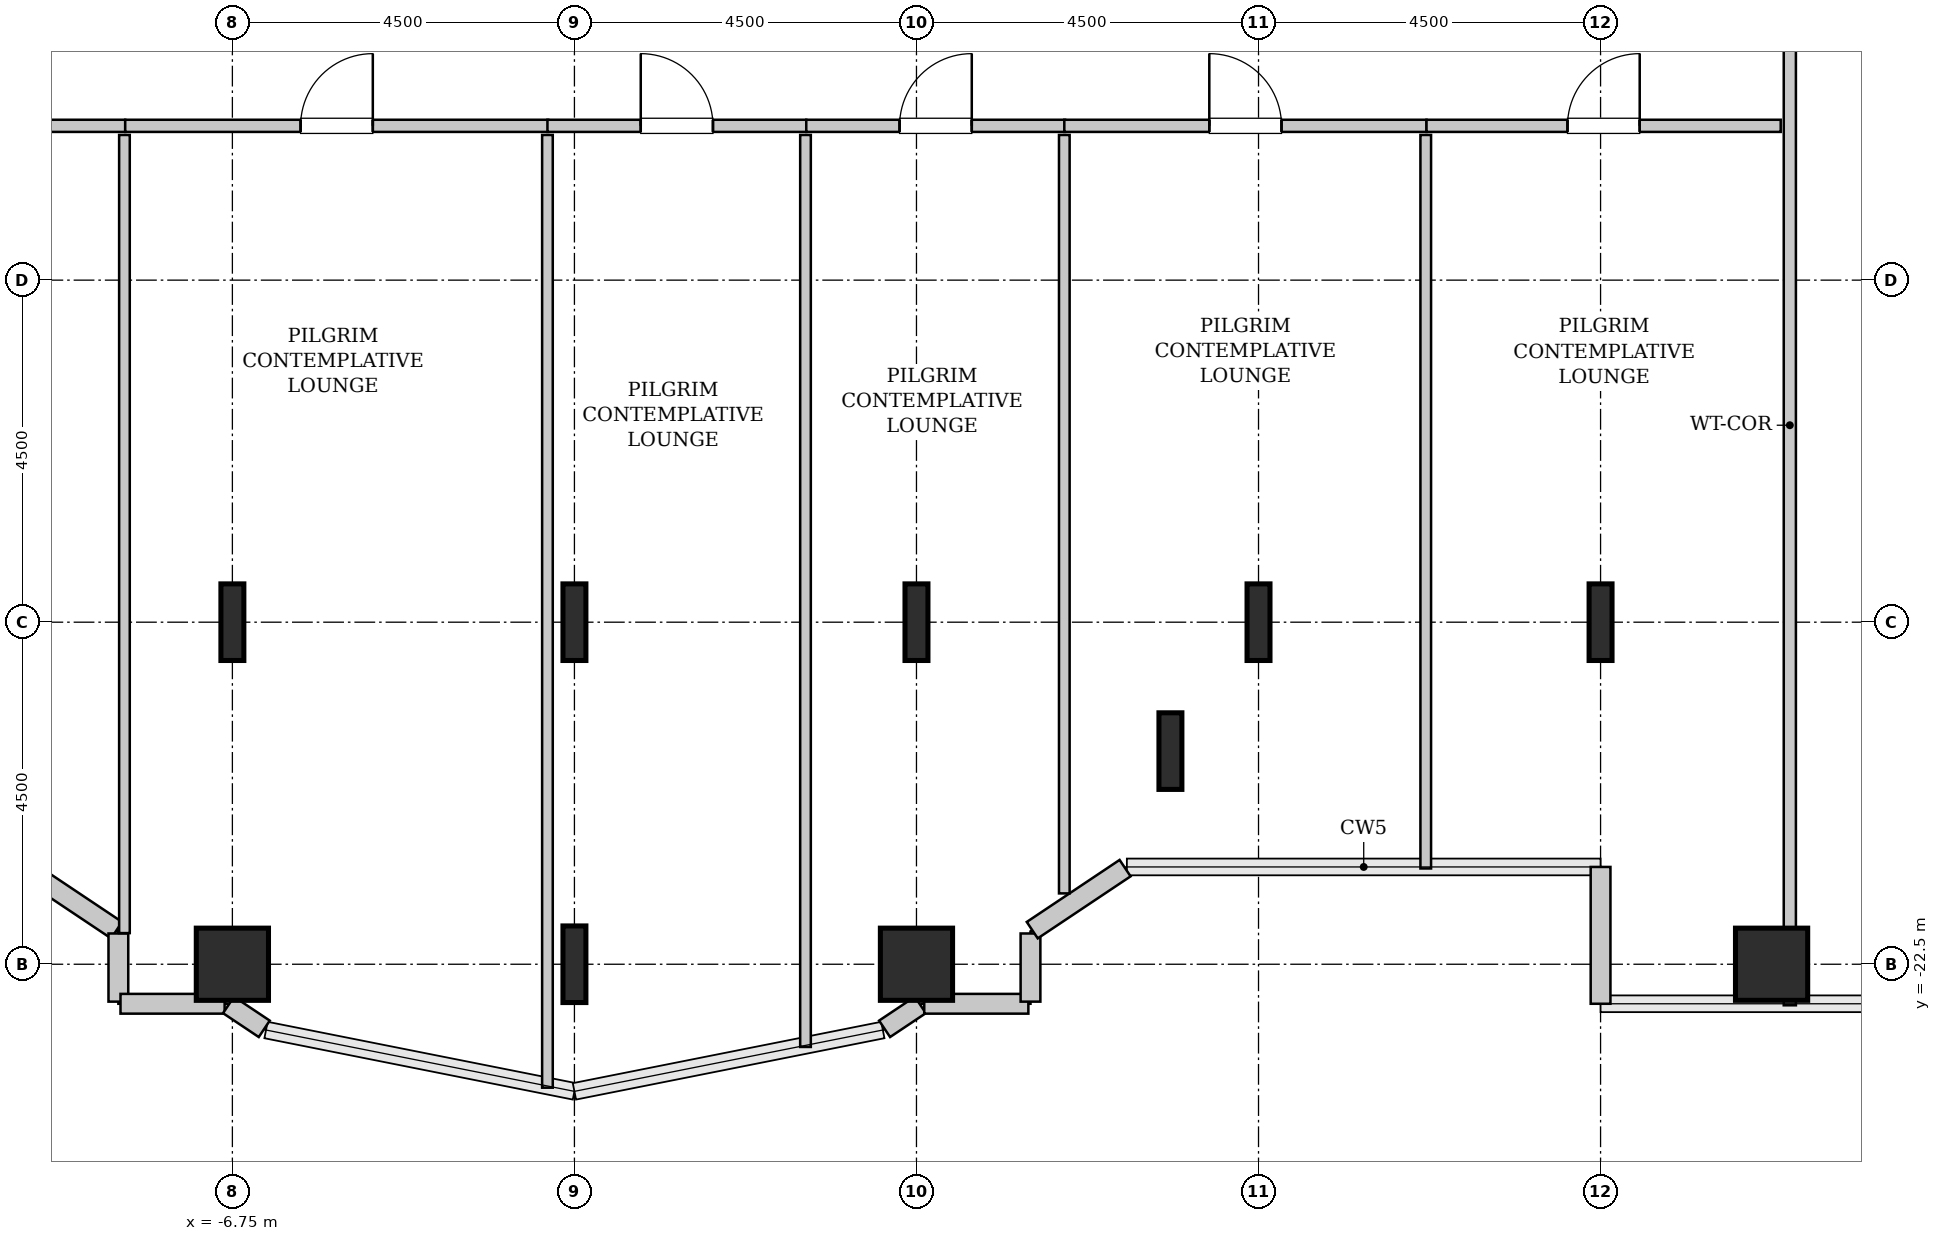
"""IFC4 building model, lengths in metres.
Left out: names, types, materials, properties, quantities, classifications, styles, units other than length and angle.
Written with IfcOpenShell. Run it as: python <this file> out.ifc"""

import sys

from ifc_helpers import new_model, si_unit, direction, frame, frame_2d, origin, origin_2d, place, context, subcontext, project, spatial, rectangle, hollow_rectangle, i_section, extrude, source, transform, mapped, element, fill, save


model = new_model("IFC4")
c1 = context("Model", 3, precision=1e-05, world=origin(), true_north=direction((0.0, 1.0)))
c2 = subcontext(c1, "Body", "Model", "MODEL_VIEW")
j1 = project(units=[si_unit("LENGTHUNIT", "METRE"), si_unit("PLANEANGLEUNIT", "RADIAN")], contexts=[c1])
p1 = place(None, origin())
s1 = spatial("IfcSite", under=j1, at=p1, CompositionType="ELEMENT")
p2 = place(p1, origin())
s2 = spatial("IfcBuilding", under=s1, at=p2, CompositionType="ELEMENT")
p3 = place(p2, frame((0.0, 0.0, 106.0)))
s3 = spatial("IfcBuildingStorey", under=s2, at=p3, CompositionType="ELEMENT", Elevation=106.0)
m1 = source(origin(), c2, "Body", "SweptSolid", [
    extrude(hollow_rectangle(XDim=0.95, YDim=0.95, WallThickness=0.045, InnerFilletRadius=0.045, OuterFilletRadius=0.09, at=origin_2d()), origin(), (0.0, 0.0, 1.0), 3.8),
])
p4 = place(p3, frame((-6.75, -22.5, 0.0), z_axis=(0.0, 0.0, 1.0), x_axis=(1.0, 0.0, 0.0)))
e1 = element("IfcColumn", 1, at=p4, inside=s3, PredefinedType="COLUMN", context=c2, shape_type="MappedRepresentation", body=[
    mapped(m1, transform((0.0, 0.0, 0.0), x_axis=(1.0, 0.0, 0.0), y_axis=(0.0, 1.0, 0.0), z_axis=(0.0, 0.0, 1.0), scale=1.0)),
])
m2 = source(origin(), c2, "Body", "SweptSolid", [
    extrude(i_section(OverallWidth=0.302, OverallDepth=1.008, WebThickness=0.021, FlangeThickness=0.04, FilletRadius=0.03, at=origin_2d()), origin(), (0.0, 0.0, 1.0), 3.8),
])
for number, where, z_axis, x_axis in (
    (2, (-6.75, -18.0, 0.0), (0.0, 0.0, 1.0), (1.0, 0.0, 0.0)),
    (3, (-2.25, -22.5, 0.0), (0.0, 0.0, 1.0), (1.0, 0.0, 0.0)),
    (4, (-2.25, -18.0, 0.0), (0.0, 0.0, 1.0), (1.0, 0.0, 0.0)),
):
    element("IfcColumn", number, at=place(p3, frame(where, z_axis=z_axis, x_axis=x_axis)), inside=s3, PredefinedType="COLUMN", context=c2, shape_type="MappedRepresentation", body=[
        mapped(m2, transform((0.0, 0.0, 0.0), x_axis=(1.0, 0.0, 0.0), y_axis=(0.0, 1.0, 0.0), z_axis=(0.0, 0.0, 1.0), scale=1.0)),
    ])
p5 = place(p3, frame((2.25, -22.5, 0.0), z_axis=(0.0, 0.0, 1.0), x_axis=(1.0, 0.0, 0.0)))
e5 = element("IfcColumn", 5, at=p5, inside=s3, PredefinedType="COLUMN", context=c2, shape_type="MappedRepresentation", body=[
    mapped(m1, transform((0.0, 0.0, 0.0), x_axis=(1.0, 0.0, 0.0), y_axis=(0.0, 1.0, 0.0), z_axis=(0.0, 0.0, 1.0), scale=1.0)),
])
for number, where, z_axis, x_axis in (
    (6, (2.25, -18.0, 0.0), (0.0, 0.0, 1.0), (1.0, 0.0, 0.0)),
    (7, (5.591, -19.696, 0.0), (0.0, 0.0, 1.0), (1.0, 0.0, 0.0)),
    (8, (6.75, -18.0, 0.0), (0.0, 0.0, 1.0), (1.0, 0.0, 0.0)),
    (9, (11.25, -18.0, 0.0), (0.0, 0.0, 1.0), (1.0, 0.0, 0.0)),
):
    element("IfcColumn", number, at=place(p3, frame(where, z_axis=z_axis, x_axis=x_axis)), inside=s3, PredefinedType="COLUMN", context=c2, shape_type="MappedRepresentation", body=[
        mapped(m2, transform((0.0, 0.0, 0.0), x_axis=(1.0, 0.0, 0.0), y_axis=(0.0, 1.0, 0.0), z_axis=(0.0, 0.0, 1.0), scale=1.0)),
    ])
p6 = place(p3, frame((13.5, -22.5, 0.0), z_axis=(0.0, 0.0, 1.0), x_axis=(1.0, 0.0, 0.0)))
e10 = element("IfcColumn", 10, at=p6, inside=s3, PredefinedType="COLUMN", context=c2, shape_type="MappedRepresentation", body=[
    mapped(m1, transform((0.0, 0.0, 0.0), x_axis=(1.0, 0.0, 0.0), y_axis=(0.0, 1.0, 0.0), z_axis=(0.0, 0.0, 1.0), scale=1.0)),
])
m3 = source(origin(), c2, "Body", "SweptSolid", [
    extrude(rectangle(XDim=1.8, YDim=0.26, at=frame_2d((0.9, 0.0))), origin(), (0.0, 0.0, 1.0), 3.55),
])
p7 = place(p3, frame((11.25, -21.22, 0.0), z_axis=(0.0, 0.0, 1.0), x_axis=(0.0, -1.0, 0.0)))
e11 = element("IfcWall", 11, at=p7, inside=s3, PredefinedType="SOLIDWALL", context=c2, shape_type="MappedRepresentation", body=[
    mapped(m3, transform((0.0, 0.0, 0.0), x_axis=(1.0, 0.0, 0.0), y_axis=(0.0, 1.0, 0.0), z_axis=(0.0, 0.0, 1.0), scale=1.0)),
])
m4 = source(origin(), c2, "Body", "SweptSolid", [
    extrude(rectangle(XDim=1.469, YDim=0.26, at=frame_2d((0.734, 0.0))), origin(), (0.0, 0.0, 1.0), 3.55),
])
p8 = place(p3, frame((-9.495, -21.236, 0.0), z_axis=(0.0, 0.0, 1.0), x_axis=(0.831461760506, -0.555581983884, 0.0)))
e12 = element("IfcWall", 12, at=p8, inside=s3, PredefinedType="SOLIDWALL", context=c2, shape_type="MappedRepresentation", body=[
    mapped(m4, transform((0.0, 0.0, 0.0), x_axis=(1.0, 0.0, 0.0), y_axis=(0.0, 1.0, 0.0), z_axis=(0.0, 0.0, 1.0), scale=1.0)),
])
m5 = source(origin(), c2, "Body", "SweptSolid", [
    extrude(rectangle(XDim=0.897, YDim=0.26, at=frame_2d((0.448, 0.0))), origin(), (0.0, 0.0, 1.0), 3.55),
])
p9 = place(p3, frame((-8.25, -22.095, 0.0), z_axis=(0.0, 0.0, 1.0), x_axis=(0.0, -1.0, 0.0)))
e13 = element("IfcWall", 13, at=p9, inside=s3, PredefinedType="SOLIDWALL", context=c2, shape_type="MappedRepresentation", body=[
    mapped(m5, transform((0.0, 0.0, 0.0), x_axis=(1.0, 0.0, 0.0), y_axis=(0.0, 1.0, 0.0), z_axis=(0.0, 0.0, 1.0), scale=1.0)),
])
m6 = source(origin(), c2, "Body", "SweptSolid", [
    extrude(rectangle(XDim=1.37, YDim=0.26, at=frame_2d((0.685, 0.0))), origin(), (0.0, 0.0, 1.0), 3.55),
])
p10 = place(p3, frame((-8.222, -23.02, 0.0), z_axis=(0.0, 0.0, 1.0), x_axis=(1.0, 0.0, 0.0)))
e14 = element("IfcWall", 14, at=p10, inside=s3, PredefinedType="SOLIDWALL", context=c2, shape_type="MappedRepresentation", body=[
    mapped(m6, transform((0.0, 0.0, 0.0), x_axis=(1.0, 0.0, 0.0), y_axis=(0.0, 1.0, 0.0), z_axis=(0.0, 0.0, 1.0), scale=1.0)),
])
m7 = source(origin(), c2, "Body", "SweptSolid", [
    extrude(rectangle(XDim=0.565, YDim=0.26, at=frame_2d((0.283, 0.0))), origin(), (0.0, 0.0, 1.0), 3.55),
])
for number, where, z_axis, x_axis in (
    (15, (-6.801, -23.036, 0.0), (0.0, 0.0, 1.0), (0.832, -0.555, 0.0)),
    (16, (1.831, -23.35, 0.0), (0.0, 0.0, 1.0), (0.832, 0.555, 0.0)),
):
    element("IfcWall", number, at=place(p3, frame(where, z_axis=z_axis, x_axis=x_axis)), inside=s3, PredefinedType="SOLIDWALL", context=c2, shape_type="MappedRepresentation", body=[
        mapped(m7, transform((0.0, 0.0, 0.0), x_axis=(1.0, 0.0, 0.0), y_axis=(0.0, 1.0, 0.0), z_axis=(0.0, 0.0, 1.0), scale=1.0)),
    ])
p11 = place(p3, frame((2.352, -23.02, 0.0), z_axis=(0.0, 0.0, 1.0), x_axis=(1.0, 0.0, 0.0)))
e17 = element("IfcWall", 17, at=p11, inside=s3, PredefinedType="SOLIDWALL", context=c2, shape_type="MappedRepresentation", body=[
    mapped(m6, transform((0.0, 0.0, 0.0), x_axis=(1.0, 0.0, 0.0), y_axis=(0.0, 1.0, 0.0), z_axis=(0.0, 0.0, 1.0), scale=1.0)),
])
p12 = place(p3, frame((3.75, -22.992, 0.0), z_axis=(0.0, 0.0, 1.0), x_axis=(0.0, 1.0, 0.0)))
e18 = element("IfcWall", 18, at=p12, inside=s3, PredefinedType="SOLIDWALL", context=c2, shape_type="MappedRepresentation", body=[
    mapped(m5, transform((0.0, 0.0, 0.0), x_axis=(1.0, 0.0, 0.0), y_axis=(0.0, 1.0, 0.0), z_axis=(0.0, 0.0, 1.0), scale=1.0)),
])
p13 = place(p3, frame((3.773, -22.052, 0.0), z_axis=(0.0, 0.0, 1.0), x_axis=(0.831461760506, 0.555581983884, 0.0)))
e19 = element("IfcWall", 19, at=p13, inside=s3, PredefinedType="SOLIDWALL", context=c2, shape_type="MappedRepresentation", body=[
    mapped(m4, transform((0.0, 0.0, 0.0), x_axis=(1.0, 0.0, 0.0), y_axis=(0.0, 1.0, 0.0), z_axis=(0.0, 0.0, 1.0), scale=1.0)),
])
m8 = source(origin(), c2, "Body", "SweptSolid", [
    extrude(rectangle(XDim=19.845, YDim=0.16, at=frame_2d((9.922, 0.0))), origin(), (0.0, 0.0, 1.0), 3.535),
])
p14 = place(p3, frame((13.74, -23.04, 0.0), z_axis=(0.0, 0.0, 1.0), x_axis=(0.0, 1.0, 0.0)))
e20 = element("IfcWall", 20, at=p14, inside=s3, PredefinedType="PARTITIONING", context=c2, shape_type="MappedRepresentation", body=[
    mapped(m8, transform((0.0, 0.0, 0.0), x_axis=(1.0, 0.0, 0.0), y_axis=(0.0, 1.0, 0.0), z_axis=(0.0, 0.0, 1.0), scale=1.0)),
])
p15 = place(p14, frame((15.212, 0.0, 0.0)))
e21 = element("IfcOpeningElement", 21, at=p15, cuts=e20, PredefinedType="OPENING", context=c2, shape_type="SweptSolid", body=[
    extrude(rectangle(XDim=0.95, YDim=2.1, at=frame_2d((0.475, 1.05))), frame((0.0, 0.09, 0.0), z_axis=(0.0, -1.0, 0.0), x_axis=(1.0, 0.0, 0.0)), (0.0, 0.0, 1.0), 0.18),
])
m9 = source(origin(), c2, "Body", "SweptSolid", [
    extrude(rectangle(XDim=5.46, YDim=0.16, at=frame_2d((2.73, 0.0))), origin(), (0.0, 0.0, 1.0), 3.535),
])
p16 = place(p3, frame((-13.62, -11.47, 0.0), z_axis=(0.0, 0.0, 1.0), x_axis=(1.0, 0.0, 0.0)))
e22 = element("IfcWall", 22, at=p16, inside=s3, PredefinedType="PARTITIONING", context=c2, shape_type="MappedRepresentation", body=[
    mapped(m9, transform((0.0, 0.0, 0.0), x_axis=(1.0, 0.0, 0.0), y_axis=(0.0, 1.0, 0.0), z_axis=(0.0, 0.0, 1.0), scale=1.0)),
])
p17 = place(p16, frame((2.255, 0.0, 0.0)))
e23 = element("IfcOpeningElement", 23, at=p17, cuts=e22, PredefinedType="OPENING", context=c2, shape_type="SweptSolid", body=[
    extrude(rectangle(XDim=0.95, YDim=2.1, at=frame_2d((0.475, 1.05))), frame((0.0, 0.09, 0.0), z_axis=(0.0, -1.0, 0.0), x_axis=(1.0, 0.0, 0.0)), (0.0, 0.0, 1.0), 0.18),
])
m10 = source(origin(), c2, "Body", "SweptSolid", [
    extrude(rectangle(XDim=10.5, YDim=0.14, at=frame_2d((5.25, 0.0))), origin(), (0.0, 0.0, 1.0), 3.535),
])
p18 = place(p3, frame((-8.17, -22.09, 0.0), z_axis=(0.0, 0.0, 1.0), x_axis=(0.0, 1.0, 0.0)))
e24 = element("IfcWall", 24, at=p18, inside=s3, PredefinedType="PARTITIONING", context=c2, shape_type="MappedRepresentation", body=[
    mapped(m10, transform((0.0, 0.0, 0.0), x_axis=(1.0, 0.0, 0.0), y_axis=(0.0, 1.0, 0.0), z_axis=(0.0, 0.0, 1.0), scale=1.0)),
])
m11 = source(origin(), c2, "Body", "SweptSolid", [
    extrude(rectangle(XDim=5.565, YDim=0.16, at=frame_2d((2.782, 0.0))), origin(), (0.0, 0.0, 1.0), 3.535),
])
p19 = place(p3, frame((-8.16, -11.47, 0.0), z_axis=(0.0, 0.0, 1.0), x_axis=(1.0, 0.0, 0.0)))
e25 = element("IfcWall", 25, at=p19, inside=s3, PredefinedType="PARTITIONING", context=c2, shape_type="MappedRepresentation", body=[
    mapped(m11, transform((0.0, 0.0, 0.0), x_axis=(1.0, 0.0, 0.0), y_axis=(0.0, 1.0, 0.0), z_axis=(0.0, 0.0, 1.0), scale=1.0)),
])
p20 = place(p19, frame((2.308, 0.0, 0.0)))
e26 = element("IfcOpeningElement", 26, at=p20, cuts=e25, PredefinedType="OPENING", context=c2, shape_type="SweptSolid", body=[
    extrude(rectangle(XDim=0.95, YDim=2.1, at=frame_2d((0.475, 1.05))), frame((0.0, 0.09, 0.0), z_axis=(0.0, -1.0, 0.0), x_axis=(1.0, 0.0, 0.0)), (0.0, 0.0, 1.0), 0.18),
])
m12 = source(origin(), c2, "Body", "SweptSolid", [
    extrude(rectangle(XDim=12.534, YDim=0.14, at=frame_2d((6.267, 0.0))), origin(), (0.0, 0.0, 1.0), 2.825),
])
p21 = place(p3, frame((-2.605, -24.124, 0.0), z_axis=(0.0, 0.0, 1.0), x_axis=(0.0, 1.0, 0.0)))
e27 = element("IfcWall", 27, at=p21, inside=s3, PredefinedType="PARTITIONING", context=c2, shape_type="MappedRepresentation", body=[
    mapped(m12, transform((0.0, 0.0, 0.0), x_axis=(1.0, 0.0, 0.0), y_axis=(0.0, 1.0, 0.0), z_axis=(0.0, 0.0, 1.0), scale=1.0)),
])
m13 = source(origin(), c2, "Body", "SweptSolid", [
    extrude(rectangle(XDim=3.405, YDim=0.16, at=frame_2d((1.703, 0.0))), origin(), (0.0, 0.0, 1.0), 3.535),
])
p22 = place(p3, frame((-2.605, -11.47, 0.0), z_axis=(0.0, 0.0, 1.0), x_axis=(1.0, 0.0, 0.0)))
e28 = element("IfcWall", 28, at=p22, inside=s3, PredefinedType="PARTITIONING", context=c2, shape_type="MappedRepresentation", body=[
    mapped(m13, transform((0.0, 0.0, 0.0), x_axis=(1.0, 0.0, 0.0), y_axis=(0.0, 1.0, 0.0), z_axis=(0.0, 0.0, 1.0), scale=1.0)),
])
p23 = place(p22, frame((1.228, 0.0, 0.0)))
e29 = element("IfcOpeningElement", 29, at=p23, cuts=e28, PredefinedType="OPENING", context=c2, shape_type="SweptSolid", body=[
    extrude(rectangle(XDim=0.95, YDim=2.1, at=frame_2d((0.475, 1.05))), frame((0.0, 0.09, 0.0), z_axis=(0.0, -1.0, 0.0), x_axis=(1.0, 0.0, 0.0)), (0.0, 0.0, 1.0), 0.18),
])
m14 = source(origin(), c2, "Body", "SweptSolid", [
    extrude(rectangle(XDim=11.998, YDim=0.14, at=frame_2d((5.999, 0.0))), origin(), (0.0, 0.0, 1.0), 3.535),
])
p24 = place(p3, frame((0.79, -23.588, 0.0), z_axis=(0.0, 0.0, 1.0), x_axis=(0.0, 1.0, 0.0)))
e30 = element("IfcWall", 30, at=p24, inside=s3, PredefinedType="PARTITIONING", context=c2, shape_type="MappedRepresentation", body=[
    mapped(m14, transform((0.0, 0.0, 0.0), x_axis=(1.0, 0.0, 0.0), y_axis=(0.0, 1.0, 0.0), z_axis=(0.0, 0.0, 1.0), scale=1.0)),
])
p25 = place(p3, frame((0.8, -11.47, 0.0), z_axis=(0.0, 0.0, 1.0), x_axis=(1.0, 0.0, 0.0)))
e31 = element("IfcWall", 31, at=p25, inside=s3, PredefinedType="PARTITIONING", context=c2, shape_type="MappedRepresentation", body=[
    mapped(m13, transform((0.0, 0.0, 0.0), x_axis=(1.0, 0.0, 0.0), y_axis=(0.0, 1.0, 0.0), z_axis=(0.0, 0.0, 1.0), scale=1.0)),
])
p26 = place(p25, frame((1.228, 0.0, 0.0)))
e32 = element("IfcOpeningElement", 32, at=p26, cuts=e31, PredefinedType="OPENING", context=c2, shape_type="SweptSolid", body=[
    extrude(rectangle(XDim=0.95, YDim=2.1, at=frame_2d((0.475, 1.05))), frame((0.0, 0.09, 0.0), z_axis=(0.0, -1.0, 0.0), x_axis=(1.0, 0.0, 0.0)), (0.0, 0.0, 1.0), 0.18),
])
m15 = source(origin(), c2, "Body", "SweptSolid", [
    extrude(rectangle(XDim=9.978, YDim=0.14, at=frame_2d((4.989, 0.0))), origin(), (0.0, 0.0, 1.0), 3.535),
])
p27 = place(p3, frame((4.195, -21.568, 0.0), z_axis=(0.0, 0.0, 1.0), x_axis=(0.0, 1.0, 0.0)))
e33 = element("IfcWall", 33, at=p27, inside=s3, PredefinedType="PARTITIONING", context=c2, shape_type="MappedRepresentation", body=[
    mapped(m15, transform((0.0, 0.0, 0.0), x_axis=(1.0, 0.0, 0.0), y_axis=(0.0, 1.0, 0.0), z_axis=(0.0, 0.0, 1.0), scale=1.0)),
])
m16 = source(origin(), c2, "Body", "SweptSolid", [
    extrude(rectangle(XDim=4.765, YDim=0.16, at=frame_2d((2.382, 0.0))), origin(), (0.0, 0.0, 1.0), 3.535),
])
p28 = place(p3, frame((4.195, -11.47, 0.0), z_axis=(0.0, 0.0, 1.0), x_axis=(1.0, 0.0, 0.0)))
e34 = element("IfcWall", 34, at=p28, inside=s3, PredefinedType="PARTITIONING", context=c2, shape_type="MappedRepresentation", body=[
    mapped(m16, transform((0.0, 0.0, 0.0), x_axis=(1.0, 0.0, 0.0), y_axis=(0.0, 1.0, 0.0), z_axis=(0.0, 0.0, 1.0), scale=1.0)),
])
p29 = place(p28, frame((1.907, 0.0, 0.0)))
e35 = element("IfcOpeningElement", 35, at=p29, cuts=e34, PredefinedType="OPENING", context=c2, shape_type="SweptSolid", body=[
    extrude(rectangle(XDim=0.95, YDim=2.1, at=frame_2d((0.475, 1.05))), frame((0.0, 0.09, 0.0), z_axis=(0.0, -1.0, 0.0), x_axis=(1.0, 0.0, 0.0)), (0.0, 0.0, 1.0), 0.18),
])
m17 = source(origin(), c2, "Body", "SweptSolid", [
    extrude(rectangle(XDim=9.65, YDim=0.14, at=frame_2d((4.825, 0.0))), origin(), (0.0, 0.0, 1.0), 3.535),
])
p30 = place(p3, frame((8.95, -21.24, 0.0), z_axis=(0.0, 0.0, 1.0), x_axis=(0.0, 1.0, 0.0)))
e36 = element("IfcWall", 36, at=p30, inside=s3, PredefinedType="PARTITIONING", context=c2, shape_type="MappedRepresentation", body=[
    mapped(m17, transform((0.0, 0.0, 0.0), x_axis=(1.0, 0.0, 0.0), y_axis=(0.0, 1.0, 0.0), z_axis=(0.0, 0.0, 1.0), scale=1.0)),
])
m18 = source(origin(), c2, "Body", "SweptSolid", [
    extrude(rectangle(XDim=4.66, YDim=0.16, at=frame_2d((2.33, 0.0))), origin(), (0.0, 0.0, 1.0), 3.535),
])
p31 = place(p3, frame((8.96, -11.47, 0.0), z_axis=(0.0, 0.0, 1.0), x_axis=(1.0, 0.0, 0.0)))
e37 = element("IfcWall", 37, at=p31, inside=s3, PredefinedType="PARTITIONING", context=c2, shape_type="MappedRepresentation", body=[
    mapped(m18, transform((0.0, 0.0, 0.0), x_axis=(1.0, 0.0, 0.0), y_axis=(0.0, 1.0, 0.0), z_axis=(0.0, 0.0, 1.0), scale=1.0)),
])
p32 = place(p31, frame((1.855, 0.0, 0.0)))
e38 = element("IfcOpeningElement", 38, at=p32, cuts=e37, PredefinedType="OPENING", context=c2, shape_type="SweptSolid", body=[
    extrude(rectangle(XDim=0.95, YDim=2.1, at=frame_2d((0.475, 1.05))), frame((0.0, 0.09, 0.0), z_axis=(0.0, -1.0, 0.0), x_axis=(1.0, 0.0, 0.0)), (0.0, 0.0, 1.0), 0.18),
])
m19 = source(origin(), c2, "Body", "SweptSolid", [
    extrude(rectangle(XDim=0.95, YDim=2.1, at=frame_2d((0.475, 1.05))), frame((0.0, 0.025, 0.0), z_axis=(0.0, -1.0, 0.0), x_axis=(1.0, 0.0, 0.0)), (0.0, 0.0, 1.0), 0.05),
])
p33 = place(p20, origin())
e39 = element("IfcDoor", 39, at=p33, inside=s3, OperationType="SINGLE_SWING_RIGHT", PredefinedType="DOOR", context=c2, shape_type="MappedRepresentation", body=[
    mapped(m19, transform((0.0, 0.0, 0.0), x_axis=(1.0, 0.0, 0.0), y_axis=(0.0, 1.0, 0.0), z_axis=(0.0, 0.0, 1.0), scale=1.0)),
])
fill(e26, e39)
p34 = place(p23, origin())
e40 = element("IfcDoor", 40, at=p34, inside=s3, OperationType="SINGLE_SWING_LEFT", PredefinedType="DOOR", context=c2, shape_type="MappedRepresentation", body=[
    mapped(m19, transform((0.0, 0.0, 0.0), x_axis=(1.0, 0.0, 0.0), y_axis=(0.0, 1.0, 0.0), z_axis=(0.0, 0.0, 1.0), scale=1.0)),
])
fill(e29, e40)
p35 = place(p26, origin())
e41 = element("IfcDoor", 41, at=p35, inside=s3, OperationType="SINGLE_SWING_RIGHT", PredefinedType="DOOR", context=c2, shape_type="MappedRepresentation", body=[
    mapped(m19, transform((0.0, 0.0, 0.0), x_axis=(1.0, 0.0, 0.0), y_axis=(0.0, 1.0, 0.0), z_axis=(0.0, 0.0, 1.0), scale=1.0)),
])
fill(e32, e41)
p36 = place(p29, origin())
e42 = element("IfcDoor", 42, at=p36, inside=s3, OperationType="SINGLE_SWING_LEFT", PredefinedType="DOOR", context=c2, shape_type="MappedRepresentation", body=[
    mapped(m19, transform((0.0, 0.0, 0.0), x_axis=(1.0, 0.0, 0.0), y_axis=(0.0, 1.0, 0.0), z_axis=(0.0, 0.0, 1.0), scale=1.0)),
])
fill(e35, e42)
p37 = place(p32, origin())
e43 = element("IfcDoor", 43, at=p37, inside=s3, OperationType="SINGLE_SWING_RIGHT", PredefinedType="DOOR", context=c2, shape_type="MappedRepresentation", body=[
    mapped(m19, transform((0.0, 0.0, 0.0), x_axis=(1.0, 0.0, 0.0), y_axis=(0.0, 1.0, 0.0), z_axis=(0.0, 0.0, 1.0), scale=1.0)),
])
fill(e38, e43)
save(model, sys.argv[1])
